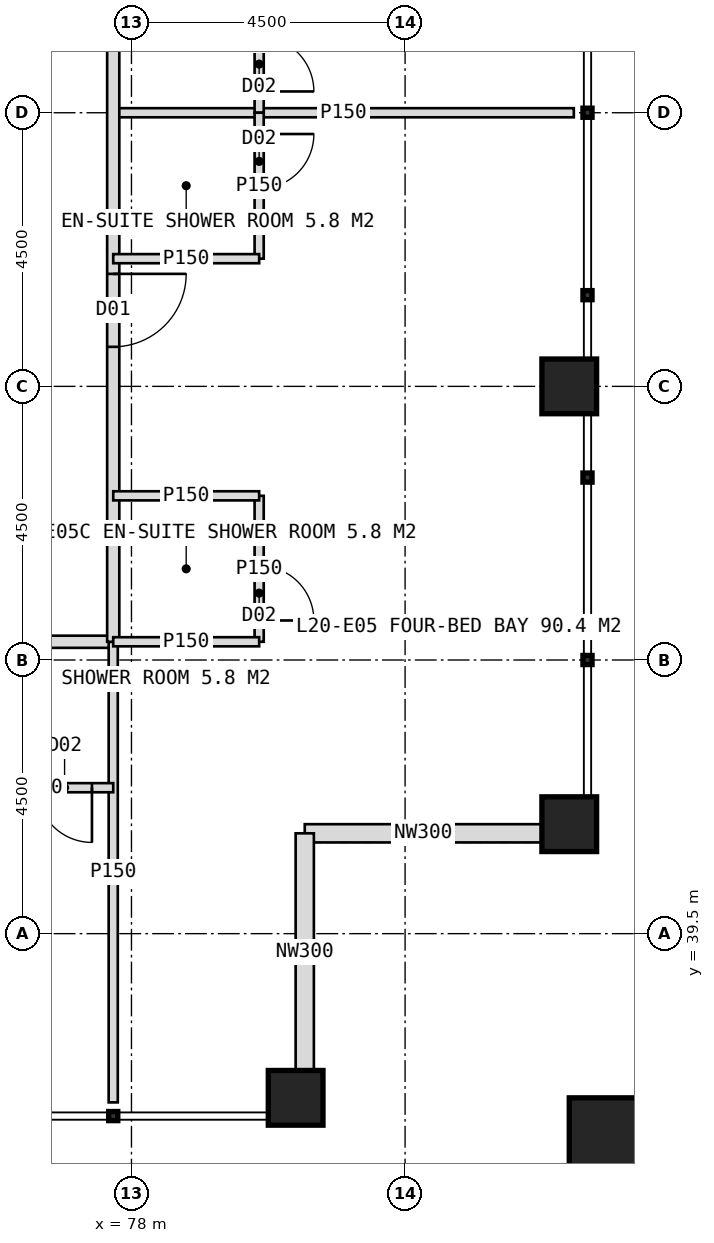
"""IFC4 building model, lengths in metres.
Left out: names, types, materials, properties, quantities, classifications, styles, units other than length and angle.
Written with IfcOpenShell. Run it as: python <this file> out.ifc"""

import sys

from ifc_helpers import new_model, si_unit, direction, frame, frame_2d, origin, origin_2d, place, context, subcontext, project, spatial, rectangle, hollow_rectangle, extrude, element, fill, save


model = new_model("IFC4")
c1 = context("Model", 3, precision=1e-05, world=origin(), true_north=direction((0.0, 1.0)))
c2 = subcontext(c1, "Body", "Model", "MODEL_VIEW")
j1 = project(units=[si_unit("LENGTHUNIT", "METRE"), si_unit("PLANEANGLEUNIT", "RADIAN")], contexts=[c1])
p1 = place(None, origin())
s1 = spatial("IfcSite", under=j1, at=p1, CompositionType="ELEMENT")
p2 = place(p1, origin())
s2 = spatial("IfcBuilding", under=s1, at=p2, CompositionType="ELEMENT")
p3 = place(p2, frame((0.0, 0.0, 87.0)))
s3 = spatial("IfcBuildingStorey", under=s2, at=p3, CompositionType="ELEMENT", Elevation=87.0)
for number, where, z_axis, x_axis in (
    (1, (85.2, 41.3, 0.0), (0.0, 0.0, 1.0), (1.0, 0.0, 0.0)),
    (2, (85.2, 48.5, 0.0), (0.0, 0.0, 1.0), (1.0, 0.0, 0.0)),
    (3, (80.7, 36.8, 0.0), (0.0, 0.0, 1.0), (1.0, 0.0, 0.0)),
):
    element("IfcColumn", number, at=place(p3, frame(where, z_axis=z_axis, x_axis=x_axis)), inside=s3, PredefinedType="COLUMN", context=c2, shape_type="SweptSolid", body=[
        extrude(hollow_rectangle(XDim=0.9, YDim=0.9, WallThickness=0.08, at=origin_2d()), origin(), (0.0, 0.0, 1.0), 4.0),
    ])
p4 = place(p3, frame((86.1, 35.9, 0.0), z_axis=(0.0, 0.0, 1.0), x_axis=(1.0, 0.0, 0.0)))
e4 = element("IfcColumn", 4, at=p4, inside=s3, PredefinedType="COLUMN", context=c2, shape_type="SweptSolid", body=[
    extrude(hollow_rectangle(XDim=1.8, YDim=1.8, WallThickness=0.1, at=origin_2d()), origin(), (0.0, 0.0, 1.0), 4.0),
])
for number, where, z_axis, x_axis in (
    (5, (84.75, 41.15, 0.0), (0.0, 0.0, 1.0), (-1.0, 0.0, 0.0)),
    (6, (80.85, 41.15, 0.0), (0.0, 0.0, 1.0), (0.0, -1.0, 0.0)),
):
    element("IfcWall", number, at=place(p3, frame(where, z_axis=z_axis, x_axis=x_axis)), inside=s3, PredefinedType="ELEMENTEDWALL", context=c2, shape_type="SweptSolid", body=[
        extrude(rectangle(XDim=3.9, YDim=0.3, at=frame_2d((1.95, 0.0))), origin(), (0.0, 0.0, 1.0), 2.95),
    ])
p5 = place(p3, frame((77.7, 44.3, 0.0), z_axis=(0.0, 0.0, 1.0), x_axis=(-1.0, 0.0, 0.0)))
e7 = element("IfcWall", 7, at=p5, inside=s3, PredefinedType="PARTITIONING", context=c2, shape_type="SweptSolid", body=[
    extrude(rectangle(XDim=35.4, YDim=0.2, at=frame_2d((17.7, 0.0))), origin(), (0.0, 0.0, 1.0), 3.75),
])
p6 = place(p5, frame((2.65, 0.0, 0.0)))
e8 = element("IfcOpeningElement", 8, at=p6, cuts=e7, PredefinedType="OPENING", context=c2, shape_type="SweptSolid", body=[
    extrude(rectangle(XDim=1.2, YDim=2.2, at=frame_2d((0.6, 1.1))), frame((0.0, 0.11, 0.0), z_axis=(0.0, -1.0, 0.0), x_axis=(1.0, 0.0, 0.0)), (0.0, 0.0, 1.0), 0.22),
])
p7 = place(p5, frame((11.35, 0.0, 0.0)))
e9 = element("IfcOpeningElement", 9, at=p7, cuts=e7, PredefinedType="OPENING", context=c2, shape_type="SweptSolid", body=[
    extrude(rectangle(XDim=1.2, YDim=2.2, at=frame_2d((0.6, 1.1))), frame((0.0, 0.11, 0.0), z_axis=(0.0, -1.0, 0.0), x_axis=(1.0, 0.0, 0.0)), (0.0, 0.0, 1.0), 0.22),
])
p8 = place(p5, frame((20.35, 0.0, 0.0)))
e10 = element("IfcOpeningElement", 10, at=p8, cuts=e7, PredefinedType="OPENING", context=c2, shape_type="SweptSolid", body=[
    extrude(rectangle(XDim=1.2, YDim=2.2, at=frame_2d((0.6, 1.1))), frame((0.0, 0.11, 0.0), z_axis=(0.0, -1.0, 0.0), x_axis=(1.0, 0.0, 0.0)), (0.0, 0.0, 1.0), 0.22),
])
p9 = place(p5, frame((29.35, 0.0, 0.0)))
e11 = element("IfcOpeningElement", 11, at=p9, cuts=e7, PredefinedType="OPENING", context=c2, shape_type="SweptSolid", body=[
    extrude(rectangle(XDim=1.2, YDim=2.2, at=frame_2d((0.6, 1.1))), frame((0.0, 0.11, 0.0), z_axis=(0.0, -1.0, 0.0), x_axis=(1.0, 0.0, 0.0)), (0.0, 0.0, 1.0), 0.22),
])
p10 = place(p3, frame((77.7, 44.3, 0.0), z_axis=(0.0, 0.0, 1.0), x_axis=(0.0, -1.0, 0.0)))
e12 = element("IfcWall", 12, at=p10, inside=s3, PredefinedType="PARTITIONING", context=c2, shape_type="SweptSolid", body=[
    extrude(rectangle(XDim=7.575, YDim=0.15, at=frame_2d((3.788, 0.0))), origin(), (0.0, 0.0, 1.0), 3.75),
])
p11 = place(p3, frame((77.7, 41.9, 0.0), z_axis=(0.0, 0.0, 1.0), x_axis=(-1.0, 0.0, 0.0)))
e13 = element("IfcWall", 13, at=p11, inside=s3, PredefinedType="PARTITIONING", context=c2, shape_type="SweptSolid", body=[
    extrude(rectangle(XDim=2.4, YDim=0.15, at=frame_2d((1.2, 0.0))), origin(), (0.0, 0.0, 1.0), 3.75),
])
p12 = place(p11, frame((0.35, 0.0, 0.0)))
e14 = element("IfcOpeningElement", 14, at=p12, cuts=e13, PredefinedType="OPENING", context=c2, shape_type="SweptSolid", body=[
    extrude(rectangle(XDim=0.9, YDim=2.1, at=frame_2d((0.45, 1.05))), frame((0.0, 0.085, 0.0), z_axis=(0.0, -1.0, 0.0), x_axis=(1.0, 0.0, 0.0)), (0.0, 0.0, 1.0), 0.17),
])
p13 = place(p3, frame((77.7, 53.0, 0.0), z_axis=(0.0, 0.0, 1.0), x_axis=(1.0, 0.0, 0.0)))
e15 = element("IfcWall", 15, at=p13, inside=s3, PredefinedType="PARTITIONING", context=c2, shape_type="SweptSolid", body=[
    extrude(rectangle(XDim=7.575, YDim=0.15, at=frame_2d((3.788, 0.0))), origin(), (0.0, 0.0, 1.0), 3.75),
])
p14 = place(p3, frame((77.7, 79.7, 0.0), z_axis=(0.0, 0.0, 1.0), x_axis=(0.0, -1.0, 0.0)))
e16 = element("IfcWall", 16, at=p14, inside=s3, PredefinedType="PARTITIONING", context=c2, shape_type="SweptSolid", body=[
    extrude(rectangle(XDim=35.4, YDim=0.2, at=frame_2d((17.7, 0.0))), origin(), (0.0, 0.0, 1.0), 3.75),
])
p15 = place(p14, frame((2.65, 0.0, 0.0)))
e17 = element("IfcOpeningElement", 17, at=p15, cuts=e16, PredefinedType="OPENING", context=c2, shape_type="SweptSolid", body=[
    extrude(rectangle(XDim=1.2, YDim=2.2, at=frame_2d((0.6, 1.1))), frame((0.0, 0.11, 0.0), z_axis=(0.0, -1.0, 0.0), x_axis=(1.0, 0.0, 0.0)), (0.0, 0.0, 1.0), 0.22),
])
p16 = place(p14, frame((8.35, 0.0, 0.0)))
e18 = element("IfcOpeningElement", 18, at=p16, cuts=e16, PredefinedType="OPENING", context=c2, shape_type="SweptSolid", body=[
    extrude(rectangle(XDim=1.2, YDim=2.2, at=frame_2d((0.6, 1.1))), frame((0.0, 0.11, 0.0), z_axis=(0.0, -1.0, 0.0), x_axis=(1.0, 0.0, 0.0)), (0.0, 0.0, 1.0), 0.22),
])
p17 = place(p14, frame((14.35, 0.0, 0.0)))
e19 = element("IfcOpeningElement", 19, at=p17, cuts=e16, PredefinedType="OPENING", context=c2, shape_type="SweptSolid", body=[
    extrude(rectangle(XDim=1.2, YDim=2.2, at=frame_2d((0.6, 1.1))), frame((0.0, 0.11, 0.0), z_axis=(0.0, -1.0, 0.0), x_axis=(1.0, 0.0, 0.0)), (0.0, 0.0, 1.0), 0.22),
])
p18 = place(p14, frame((20.35, 0.0, 0.0)))
e20 = element("IfcOpeningElement", 20, at=p18, cuts=e16, PredefinedType="OPENING", context=c2, shape_type="SweptSolid", body=[
    extrude(rectangle(XDim=1.2, YDim=2.2, at=frame_2d((0.6, 1.1))), frame((0.0, 0.11, 0.0), z_axis=(0.0, -1.0, 0.0), x_axis=(1.0, 0.0, 0.0)), (0.0, 0.0, 1.0), 0.22),
])
p19 = place(p14, frame((29.35, 0.0, 0.0)))
e21 = element("IfcOpeningElement", 21, at=p19, cuts=e16, PredefinedType="OPENING", context=c2, shape_type="SweptSolid", body=[
    extrude(rectangle(XDim=1.2, YDim=2.2, at=frame_2d((0.6, 1.1))), frame((0.0, 0.11, 0.0), z_axis=(0.0, -1.0, 0.0), x_axis=(1.0, 0.0, 0.0)), (0.0, 0.0, 1.0), 0.22),
])
p20 = place(p3, frame((80.1, 55.4, 0.0), z_axis=(0.0, 0.0, 1.0), x_axis=(0.0, -1.0, 0.0)))
e22 = element("IfcWall", 22, at=p20, inside=s3, PredefinedType="PARTITIONING", context=c2, shape_type="SweptSolid", body=[
    extrude(rectangle(XDim=2.4, YDim=0.15, at=frame_2d((1.2, 0.0))), origin(), (0.0, 0.0, 1.0), 3.75),
])
p21 = place(p20, frame((1.15, 0.0, 0.0)))
e23 = element("IfcOpeningElement", 23, at=p21, cuts=e22, PredefinedType="OPENING", context=c2, shape_type="SweptSolid", body=[
    extrude(rectangle(XDim=0.9, YDim=2.1, at=frame_2d((0.45, 1.05))), frame((0.0, 0.085, 0.0), z_axis=(0.0, -1.0, 0.0), x_axis=(1.0, 0.0, 0.0)), (0.0, 0.0, 1.0), 0.17),
])
p22 = place(p3, frame((80.1, 53.0, 0.0), z_axis=(0.0, 0.0, 1.0), x_axis=(0.0, -1.0, 0.0)))
e24 = element("IfcWall", 24, at=p22, inside=s3, PredefinedType="PARTITIONING", context=c2, shape_type="SweptSolid", body=[
    extrude(rectangle(XDim=2.4, YDim=0.15, at=frame_2d((1.2, 0.0))), origin(), (0.0, 0.0, 1.0), 3.75),
])
p23 = place(p22, frame((0.35, 0.0, 0.0)))
e25 = element("IfcOpeningElement", 25, at=p23, cuts=e24, PredefinedType="OPENING", context=c2, shape_type="SweptSolid", body=[
    extrude(rectangle(XDim=0.9, YDim=2.1, at=frame_2d((0.45, 1.05))), frame((0.0, 0.085, 0.0), z_axis=(0.0, -1.0, 0.0), x_axis=(1.0, 0.0, 0.0)), (0.0, 0.0, 1.0), 0.17),
])
p24 = place(p3, frame((77.7, 50.6, 0.0), z_axis=(0.0, 0.0, 1.0), x_axis=(1.0, 0.0, 0.0)))
e26 = element("IfcWall", 26, at=p24, inside=s3, PredefinedType="PARTITIONING", context=c2, shape_type="SweptSolid", body=[
    extrude(rectangle(XDim=2.4, YDim=0.15, at=frame_2d((1.2, 0.0))), origin(), (0.0, 0.0, 1.0), 3.75),
])
p25 = place(p3, frame((80.1, 46.7, 0.0), z_axis=(0.0, 0.0, 1.0), x_axis=(0.0, -1.0, 0.0)))
e27 = element("IfcWall", 27, at=p25, inside=s3, PredefinedType="PARTITIONING", context=c2, shape_type="SweptSolid", body=[
    extrude(rectangle(XDim=2.4, YDim=0.15, at=frame_2d((1.2, 0.0))), origin(), (0.0, 0.0, 1.0), 3.75),
])
p26 = place(p25, frame((1.15, 0.0, 0.0)))
e28 = element("IfcOpeningElement", 28, at=p26, cuts=e27, PredefinedType="OPENING", context=c2, shape_type="SweptSolid", body=[
    extrude(rectangle(XDim=0.9, YDim=2.1, at=frame_2d((0.45, 1.05))), frame((0.0, 0.085, 0.0), z_axis=(0.0, -1.0, 0.0), x_axis=(1.0, 0.0, 0.0)), (0.0, 0.0, 1.0), 0.17),
])
for number, where, z_axis, x_axis in (
    (29, (77.7, 46.7, 0.0), (0.0, 0.0, 1.0), (1.0, 0.0, 0.0)),
    (30, (77.7, 44.3, 0.0), (0.0, 0.0, 1.0), (1.0, 0.0, 0.0)),
):
    element("IfcWall", number, at=place(p3, frame(where, z_axis=z_axis, x_axis=x_axis)), inside=s3, PredefinedType="PARTITIONING", context=c2, shape_type="SweptSolid", body=[
        extrude(rectangle(XDim=2.4, YDim=0.15, at=frame_2d((1.2, 0.0))), origin(), (0.0, 0.0, 1.0), 3.75),
    ])
p27 = place(p12, origin())
e31 = element("IfcDoor", 31, at=p27, inside=s3, OperationType="SINGLE_SWING_LEFT", PredefinedType="DOOR", context=c2, shape_type="SweptSolid", body=[
    extrude(rectangle(XDim=0.9, YDim=2.1, at=frame_2d((0.45, 1.05))), frame((0.0, 0.025, 0.0), z_axis=(0.0, -1.0, 0.0), x_axis=(1.0, 0.0, 0.0)), (0.0, 0.0, 1.0), 0.05),
])
fill(e14, e31)
p28 = place(p21, origin())
e32 = element("IfcDoor", 32, at=p28, inside=s3, OperationType="SINGLE_SWING_RIGHT", PredefinedType="DOOR", context=c2, shape_type="SweptSolid", body=[
    extrude(rectangle(XDim=0.9, YDim=2.1, at=frame_2d((0.45, 1.05))), frame((0.0, 0.025, 0.0), z_axis=(0.0, -1.0, 0.0), x_axis=(1.0, 0.0, 0.0)), (0.0, 0.0, 1.0), 0.05),
])
fill(e23, e32)
p29 = place(p19, origin())
e33 = element("IfcDoor", 33, at=p29, inside=s3, OperationType="SINGLE_SWING_LEFT", PredefinedType="DOOR", context=c2, shape_type="SweptSolid", body=[
    extrude(rectangle(XDim=1.2, YDim=2.2, at=frame_2d((0.6, 1.1))), frame((0.0, 0.025, 0.0), z_axis=(0.0, -1.0, 0.0), x_axis=(1.0, 0.0, 0.0)), (0.0, 0.0, 1.0), 0.05),
])
fill(e21, e33)
p30 = place(p23, origin())
e34 = element("IfcDoor", 34, at=p30, inside=s3, OperationType="SINGLE_SWING_LEFT", PredefinedType="DOOR", context=c2, shape_type="SweptSolid", body=[
    extrude(rectangle(XDim=0.9, YDim=2.1, at=frame_2d((0.45, 1.05))), frame((0.0, 0.025, 0.0), z_axis=(0.0, -1.0, 0.0), x_axis=(1.0, 0.0, 0.0)), (0.0, 0.0, 1.0), 0.05),
])
fill(e25, e34)
p31 = place(p26, origin())
e35 = element("IfcDoor", 35, at=p31, inside=s3, OperationType="SINGLE_SWING_RIGHT", PredefinedType="DOOR", context=c2, shape_type="SweptSolid", body=[
    extrude(rectangle(XDim=0.9, YDim=2.1, at=frame_2d((0.45, 1.05))), frame((0.0, 0.025, 0.0), z_axis=(0.0, -1.0, 0.0), x_axis=(1.0, 0.0, 0.0)), (0.0, 0.0, 1.0), 0.05),
])
fill(e28, e35)
save(model, sys.argv[1])
